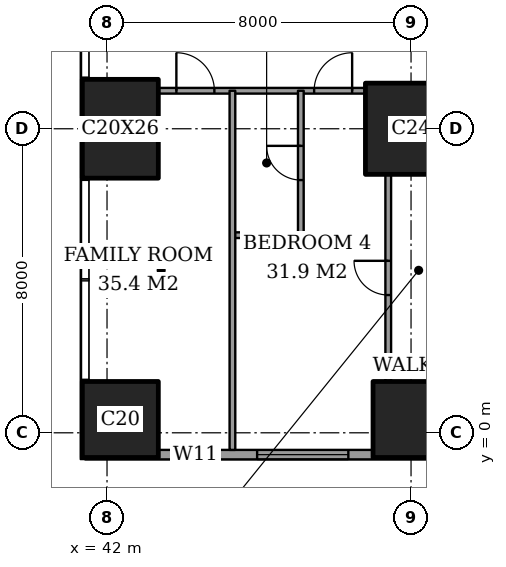
"""IFC4 building model, lengths in metres.
Left out: names, types, materials, properties, quantities, classifications, styles, units other than length and angle.
Written with IfcOpenShell. Run it as: python <this file> out.ifc"""

import sys

from ifc_helpers import new_model, si_unit, direction, frame, frame_2d, origin, origin_2d, place, context, subcontext, project, spatial, rectangle, extrude, element, fill, save


model = new_model("IFC4")
c1 = context("Model", 3, precision=1e-05, world=origin(), true_north=direction((0.0, 1.0)))
c2 = subcontext(c1, "Body", "Model", "MODEL_VIEW")
j1 = project(units=[si_unit("LENGTHUNIT", "METRE"), si_unit("PLANEANGLEUNIT", "RADIAN")], contexts=[c1])
p1 = place(None, origin())
s1 = spatial("IfcSite", under=j1, at=p1, CompositionType="ELEMENT")
p2 = place(p1, origin())
s2 = spatial("IfcBuilding", under=s1, at=p2, CompositionType="ELEMENT")
p3 = place(p2, frame((0.0, 0.0, 125.0)))
s3 = spatial("IfcBuildingStorey", under=s2, at=p3, CompositionType="ELEMENT", Elevation=125.0)
p4 = place(p3, frame((42.35, 0.35, 0.0), z_axis=(0.0, 0.0, 1.0), x_axis=(1.0, 0.0, 0.0)))
e1 = element("IfcColumn", 1, at=p4, inside=s3, PredefinedType="COLUMN", context=c2, shape_type="SweptSolid", body=[
    extrude(rectangle(XDim=2.0, YDim=2.0, at=origin_2d()), origin(), (0.0, 0.0, 1.0), 3.6),
])
p5 = place(p3, frame((42.35, 8.0, 0.0), z_axis=(0.0, 0.0, 1.0), x_axis=(1.0, 0.0, 0.0)))
e2 = element("IfcColumn", 2, at=p5, inside=s3, PredefinedType="COLUMN", context=c2, shape_type="SweptSolid", body=[
    extrude(rectangle(XDim=2.0, YDim=2.6, at=origin_2d()), origin(), (0.0, 0.0, 1.0), 3.6),
])
p6 = place(p3, frame((50.0, 0.35, 0.0), z_axis=(0.0, 0.0, 1.0), x_axis=(1.0, 0.0, 0.0)))
e3 = element("IfcColumn", 3, at=p6, inside=s3, PredefinedType="COLUMN", context=c2, shape_type="SweptSolid", body=[
    extrude(rectangle(XDim=2.0, YDim=2.0, at=origin_2d()), origin(), (0.0, 0.0, 1.0), 3.6),
])
p7 = place(p3, frame((50.0, 8.0, 0.0), z_axis=(0.0, 0.0, 1.0), x_axis=(1.0, 0.0, 0.0)))
e4 = element("IfcColumn", 4, at=p7, inside=s3, PredefinedType="COLUMN", context=c2, shape_type="SweptSolid", body=[
    extrude(rectangle(XDim=2.4, YDim=2.4, at=origin_2d()), origin(), (0.0, 0.0, 1.0), 3.6),
])
p8 = place(p3, frame((41.425, -0.575, 0.0), z_axis=(0.0, 0.0, 1.0), x_axis=(1.0, 0.0, 0.0)))
e5 = element("IfcWall", 5, at=p8, inside=s3, PredefinedType="SOLIDWALL", context=c2, shape_type="SweptSolid", body=[
    extrude(rectangle(XDim=21.4, YDim=0.25, at=frame_2d((10.7, 0.0))), origin(), (0.0, 0.0, 1.0), 3.6),
])
p9 = place(p8, frame((2.3, 0.0, 0.4)))
e6 = element("IfcOpeningElement", 6, at=p9, cuts=e5, PredefinedType="OPENING", context=c2, shape_type="SweptSolid", body=[
    extrude(rectangle(XDim=1.2, YDim=2.2, at=frame_2d((0.6, 1.1))), frame((0.0, 0.135, 0.0), z_axis=(0.0, -1.0, 0.0), x_axis=(1.0, 0.0, 0.0)), (0.0, 0.0, 1.0), 0.27),
])
p10 = place(p8, frame((4.525, 0.0, 0.4)))
e7 = element("IfcOpeningElement", 7, at=p10, cuts=e5, PredefinedType="OPENING", context=c2, shape_type="SweptSolid", body=[
    extrude(rectangle(XDim=2.4, YDim=2.2, at=frame_2d((1.2, 1.1))), frame((0.0, 0.135, 0.0), z_axis=(0.0, -1.0, 0.0), x_axis=(1.0, 0.0, 0.0)), (0.0, 0.0, 1.0), 0.27),
])
p11 = place(p8, frame((9.9, 0.0, 0.4)))
e8 = element("IfcOpeningElement", 8, at=p11, cuts=e5, PredefinedType="OPENING", context=c2, shape_type="SweptSolid", body=[
    extrude(rectangle(XDim=1.2, YDim=2.2, at=frame_2d((0.6, 1.1))), frame((0.0, 0.135, 0.0), z_axis=(0.0, -1.0, 0.0), x_axis=(1.0, 0.0, 0.0)), (0.0, 0.0, 1.0), 0.27),
])
p12 = place(p8, frame((12.225, 0.0, 0.4)))
e9 = element("IfcOpeningElement", 9, at=p12, cuts=e5, PredefinedType="OPENING", context=c2, shape_type="SweptSolid", body=[
    extrude(rectangle(XDim=2.4, YDim=2.2, at=frame_2d((1.2, 1.1))), frame((0.0, 0.135, 0.0), z_axis=(0.0, -1.0, 0.0), x_axis=(1.0, 0.0, 0.0)), (0.0, 0.0, 1.0), 0.27),
])
p13 = place(p8, frame((19.2, 0.0, 0.4)))
e10 = element("IfcOpeningElement", 10, at=p13, cuts=e5, PredefinedType="OPENING", context=c2, shape_type="SweptSolid", body=[
    extrude(rectangle(XDim=1.2, YDim=2.2, at=frame_2d((0.6, 1.1))), frame((0.0, 0.135, 0.0), z_axis=(0.0, -1.0, 0.0), x_axis=(1.0, 0.0, 0.0)), (0.0, 0.0, 1.0), 0.27),
])
p14 = place(p3, frame((45.3, 5.2, 0.0), z_axis=(0.0, 0.0, 1.0), x_axis=(1.0, 0.0, 0.0)))
e11 = element("IfcWall", 11, at=p14, inside=s3, PredefinedType="PARTITIONING", context=c2, shape_type="SweptSolid", body=[
    extrude(rectangle(XDim=1.8, YDim=0.15, at=frame_2d((0.9, 0.0))), origin(), (0.0, 0.0, 1.0), 3.35),
])
p15 = place(p3, frame((43.35, 9.0, 0.0), z_axis=(0.0, 0.0, 1.0), x_axis=(1.0, 0.0, 0.0)))
e12 = element("IfcWall", 12, at=p15, inside=s3, PredefinedType="PARTITIONING", context=c2, shape_type="SweptSolid", body=[
    extrude(rectangle(XDim=5.45, YDim=0.15, at=frame_2d((2.725, 0.0))), origin(), (0.0, 0.0, 1.0), 3.35),
])
p16 = place(p15, frame((4.1, 0.0, 0.0)))
e13 = element("IfcOpeningElement", 13, at=p16, cuts=e12, PredefinedType="OPENING", context=c2, shape_type="SweptSolid", body=[
    extrude(rectangle(XDim=1.0, YDim=2.1, at=frame_2d((0.5, 1.05))), frame((0.0, 0.085, 0.0), z_axis=(0.0, -1.0, 0.0), x_axis=(1.0, 0.0, 0.0)), (0.0, 0.0, 1.0), 0.17),
])
p17 = place(p15, frame((0.475, 0.0, 0.0)))
e14 = element("IfcOpeningElement", 14, at=p17, cuts=e12, PredefinedType="OPENING", context=c2, shape_type="SweptSolid", body=[
    extrude(rectangle(XDim=1.0, YDim=2.1, at=frame_2d((0.5, 1.05))), frame((0.0, 0.085, 0.0), z_axis=(0.0, -1.0, 0.0), x_axis=(1.0, 0.0, 0.0)), (0.0, 0.0, 1.0), 0.17),
])
p18 = place(p3, frame((45.3, -0.45, 0.0), z_axis=(0.0, 0.0, 1.0), x_axis=(0.0, 1.0, 0.0)))
e15 = element("IfcWall", 15, at=p18, inside=s3, PredefinedType="PARTITIONING", context=c2, shape_type="SweptSolid", body=[
    extrude(rectangle(XDim=9.45, YDim=0.15, at=frame_2d((4.725, 0.0))), origin(), (0.0, 0.0, 1.0), 3.35),
])
p19 = place(p3, frame((47.1, 5.2, 0.0), z_axis=(0.0, 0.0, 1.0), x_axis=(0.0, 1.0, 0.0)))
e16 = element("IfcWall", 16, at=p19, inside=s3, PredefinedType="PARTITIONING", context=c2, shape_type="SweptSolid", body=[
    extrude(rectangle(XDim=3.8, YDim=0.15, at=frame_2d((1.9, 0.0))), origin(), (0.0, 0.0, 1.0), 3.35),
])
p20 = place(p19, frame((1.45, 0.0, 0.0)))
e17 = element("IfcOpeningElement", 17, at=p20, cuts=e16, PredefinedType="OPENING", context=c2, shape_type="SweptSolid", body=[
    extrude(rectangle(XDim=0.9, YDim=2.1, at=frame_2d((0.45, 1.05))), frame((0.0, 0.085, 0.0), z_axis=(0.0, -1.0, 0.0), x_axis=(1.0, 0.0, 0.0)), (0.0, 0.0, 1.0), 0.17),
])
p21 = place(p3, frame((49.4, 1.35, 0.0), z_axis=(0.0, 0.0, 1.0), x_axis=(0.0, 1.0, 0.0)))
e18 = element("IfcWall", 18, at=p21, inside=s3, PredefinedType="PARTITIONING", context=c2, shape_type="SweptSolid", body=[
    extrude(rectangle(XDim=5.45, YDim=0.15, at=frame_2d((2.725, 0.0))), origin(), (0.0, 0.0, 1.0), 3.35),
])
p22 = place(p21, frame((2.275, 0.0, 0.0)))
e19 = element("IfcOpeningElement", 19, at=p22, cuts=e18, PredefinedType="OPENING", context=c2, shape_type="SweptSolid", body=[
    extrude(rectangle(XDim=0.9, YDim=2.1, at=frame_2d((0.45, 1.05))), frame((0.0, 0.085, 0.0), z_axis=(0.0, -1.0, 0.0), x_axis=(1.0, 0.0, 0.0)), (0.0, 0.0, 1.0), 0.17),
])
p23 = place(p9, origin())
e20 = element("IfcWindow", 20, at=p23, inside=s3, PartitioningType="SINGLE_PANEL", PredefinedType="WINDOW", context=c2, shape_type="SweptSolid", body=[
    extrude(rectangle(XDim=1.2, YDim=2.2, at=frame_2d((0.6, 1.1))), frame((0.0, 0.03, 0.0), z_axis=(0.0, -1.0, 0.0), x_axis=(1.0, 0.0, 0.0)), (0.0, 0.0, 1.0), 0.06),
])
fill(e6, e20)
p24 = place(p10, origin())
e21 = element("IfcWindow", 21, at=p24, inside=s3, PartitioningType="SINGLE_PANEL", PredefinedType="WINDOW", context=c2, shape_type="SweptSolid", body=[
    extrude(rectangle(XDim=2.4, YDim=2.2, at=frame_2d((1.2, 1.1))), frame((0.0, 0.03, 0.0), z_axis=(0.0, -1.0, 0.0), x_axis=(1.0, 0.0, 0.0)), (0.0, 0.0, 1.0), 0.06),
])
fill(e7, e21)
p25 = place(p22, origin())
e22 = element("IfcDoor", 22, at=p25, inside=s3, OperationType="SINGLE_SWING_LEFT", PredefinedType="DOOR", context=c2, shape_type="SweptSolid", body=[
    extrude(rectangle(XDim=0.9, YDim=2.1, at=frame_2d((0.45, 1.05))), frame((0.0, 0.025, 0.0), z_axis=(0.0, -1.0, 0.0), x_axis=(1.0, 0.0, 0.0)), (0.0, 0.0, 1.0), 0.05),
])
fill(e19, e22)
p26 = place(p20, origin())
e23 = element("IfcDoor", 23, at=p26, inside=s3, OperationType="SINGLE_SWING_LEFT", PredefinedType="DOOR", context=c2, shape_type="SweptSolid", body=[
    extrude(rectangle(XDim=0.9, YDim=2.1, at=frame_2d((0.45, 1.05))), frame((0.0, 0.025, 0.0), z_axis=(0.0, -1.0, 0.0), x_axis=(1.0, 0.0, 0.0)), (0.0, 0.0, 1.0), 0.05),
])
fill(e17, e23)
p27 = place(p16, origin())
e24 = element("IfcDoor", 24, at=p27, inside=s3, OperationType="SINGLE_SWING_LEFT", PredefinedType="DOOR", context=c2, shape_type="SweptSolid", body=[
    extrude(rectangle(XDim=1.0, YDim=2.1, at=frame_2d((0.5, 1.05))), frame((0.0, 0.025, 0.0), z_axis=(0.0, -1.0, 0.0), x_axis=(1.0, 0.0, 0.0)), (0.0, 0.0, 1.0), 0.05),
])
fill(e13, e24)
p28 = place(p17, origin())
e25 = element("IfcDoor", 25, at=p28, inside=s3, OperationType="SINGLE_SWING_RIGHT", PredefinedType="DOOR", context=c2, shape_type="SweptSolid", body=[
    extrude(rectangle(XDim=1.0, YDim=2.1, at=frame_2d((0.5, 1.05))), frame((0.0, 0.025, 0.0), z_axis=(0.0, -1.0, 0.0), x_axis=(1.0, 0.0, 0.0)), (0.0, 0.0, 1.0), 0.05),
])
fill(e14, e25)
save(model, sys.argv[1])
